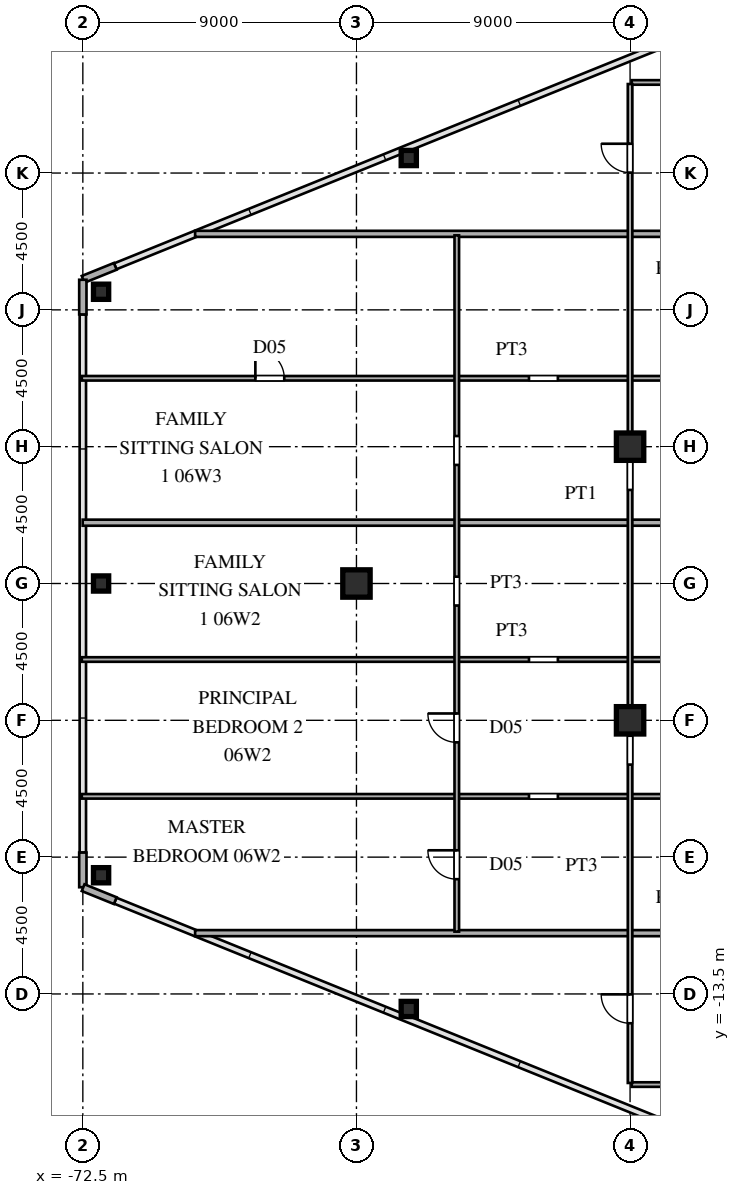
"""IFC4 building model, lengths in metres.
Left out: names, types, materials, properties, quantities, classifications, styles, units other than length and angle.
Written with IfcOpenShell. Run it as: python <this file> out.ifc"""

import sys

from ifc_helpers import new_model, si_unit, direction, frame, frame_2d, origin, origin_2d, place, context, subcontext, project, spatial, rectangle, hollow_rectangle, i_section, extrude, source, transform, mapped, element, fill, save


model = new_model("IFC4")
c1 = context("Model", 3, precision=1e-05, world=origin(), true_north=direction((0.0, 1.0)))
c2 = subcontext(c1, "Body", "Model", "MODEL_VIEW")
j1 = project(units=[si_unit("LENGTHUNIT", "METRE"), si_unit("PLANEANGLEUNIT", "RADIAN")], contexts=[c1])
p1 = place(None, origin())
s1 = spatial("IfcSite", under=j1, at=p1, CompositionType="ELEMENT")
p2 = place(p1, origin())
s2 = spatial("IfcBuilding", under=s1, at=p2, CompositionType="ELEMENT")
p3 = place(p2, frame((0.0, 0.0, 26.1)))
s3 = spatial("IfcBuildingStorey", under=s2, at=p3, CompositionType="ELEMENT", Elevation=26.1)
m1 = source(origin(), c2, "Body", "SweptSolid", [
    extrude(i_section(OverallWidth=0.9, OverallDepth=0.9, WebThickness=0.036, FlangeThickness=0.055, at=origin_2d()), origin(), (0.0, 0.0, 1.0), 3.6),
])
for number, where, z_axis, x_axis in (
    (1, (-54.5, -4.5, 0.0), (0.0, 0.0, 1.0), (1.0, 0.0, 0.0)),
    (2, (-54.5, 4.5, 0.0), (0.0, 0.0, 1.0), (1.0, 0.0, 0.0)),
    (3, (-63.5, 0.0, 0.0), (0.0, 0.0, 1.0), (1.0, 0.0, 0.0)),
):
    element("IfcColumn", number, at=place(p3, frame(where, z_axis=z_axis, x_axis=x_axis)), inside=s3, PredefinedType="COLUMN", context=c2, shape_type="MappedRepresentation", body=[
        mapped(m1, transform((0.0, 0.0, 0.0), scale=1.0)),
    ])
m2 = source(origin(), c2, "Body", "SweptSolid", [
    extrude(hollow_rectangle(XDim=0.5, YDim=0.5, WallThickness=0.02, at=origin_2d()), origin(), (0.0, 0.0, 1.0), 3.6),
])
for number, where, z_axis, x_axis in (
    (4, (-71.9, 9.596, 0.0), (0.0, 0.0, 1.0), (1.0, 0.0, 0.0)),
    (5, (-71.9, -9.596, 0.0), (0.0, 0.0, 1.0), (1.0, 0.0, 0.0)),
    (6, (-61.779, -13.994, 0.0), (0.0, 0.0, 1.0), (1.0, 0.0, 0.0)),
    (7, (-61.779, 13.994, 0.0), (0.0, 0.0, 1.0), (1.0, 0.0, 0.0)),
    (8, (-71.9, 0.0, 0.0), (0.0, 0.0, 1.0), (1.0, 0.0, 0.0)),
):
    element("IfcColumn", number, at=place(p3, frame(where, z_axis=z_axis, x_axis=x_axis)), inside=s3, PredefinedType="COLUMN", context=c2, shape_type="MappedRepresentation", body=[
        mapped(m2, transform((0.0, 0.0, 0.0), scale=1.0)),
    ])
for number, where, z_axis, x_axis in (
    (9, (-71.434, 10.431, 0.0), (0.0, 0.0, 1.0), (-0.927, -0.375, 0.0)),
    (10, (-72.5, 9.99, 0.0), (0.0, 0.0, 1.0), (0.0, -1.0, 0.0)),
    (11, (-72.5, -8.85, 0.0), (0.0, 0.0, 1.0), (0.0, -1.0, 0.0)),
    (12, (-72.491, -10.004, 0.0), (0.0, 0.0, 1.0), (0.927, -0.375, 0.0)),
):
    element("IfcWall", number, at=place(p3, frame(where, z_axis=z_axis, x_axis=x_axis)), inside=s3, PredefinedType="SOLIDWALL", context=c2, shape_type="SweptSolid", body=[
        extrude(rectangle(XDim=1.14, YDim=0.24, at=frame_2d((0.57, 0.0))), origin(), (0.0, 0.0, 1.0), 3.38),
    ])
p4 = place(p3, frame((-54.45, -16.48, 0.0), z_axis=(0.0, 0.0, 1.0), x_axis=(1.0, 0.0, 0.0)))
e13 = element("IfcWall", 13, at=p4, inside=s3, PredefinedType="PARTITIONING", context=c2, shape_type="SweptSolid", body=[
    extrude(rectangle(XDim=10.2, YDim=0.15, at=frame_2d((5.1, 0.0))), origin(), (0.0, 0.0, 1.0), 3.38),
])
p5 = place(p4, frame((4.625, 0.0, 0.0)))
e14 = element("IfcOpeningElement", 14, at=p5, cuts=e13, PredefinedType="OPENING", context=c2, shape_type="SweptSolid", body=[
    extrude(rectangle(XDim=0.95, YDim=2.15, at=frame_2d((0.475, 1.075))), frame((0.0, 0.085, 0.0), z_axis=(0.0, -1.0, 0.0), x_axis=(1.0, 0.0, 0.0)), (0.0, 0.0, 1.0), 0.17),
])
p6 = place(p3, frame((-68.807, -11.5, 0.0), z_axis=(0.0, 0.0, 1.0), x_axis=(1.0, 0.0, 0.0)))
e15 = element("IfcWall", 15, at=p6, inside=s3, PredefinedType="PARTITIONING", context=c2, shape_type="SweptSolid", body=[
    extrude(rectangle(XDim=29.077, YDim=0.2, at=frame_2d((14.539, 0.0))), origin(), (0.0, 0.0, 1.0), 3.38),
])
p7 = place(p3, frame((-72.535, -7.0, 0.0), z_axis=(0.0, 0.0, 1.0), x_axis=(1.0, 0.0, 0.0)))
e16 = element("IfcWall", 16, at=p7, inside=s3, PredefinedType="PARTITIONING", context=c2, shape_type="SweptSolid", body=[
    extrude(rectangle(XDim=28.285, YDim=0.15, at=frame_2d((14.143, 0.0))), origin(), (0.0, 0.0, 1.0), 3.38),
])
p8 = place(p7, frame((22.71, 0.0, 0.0)))
e17 = element("IfcOpeningElement", 17, at=p8, cuts=e16, PredefinedType="OPENING", context=c2, shape_type="SweptSolid", body=[
    extrude(rectangle(XDim=0.95, YDim=2.15, at=frame_2d((0.475, 1.075))), frame((0.0, 0.085, 0.0), z_axis=(0.0, -1.0, 0.0), x_axis=(1.0, 0.0, 0.0)), (0.0, 0.0, 1.0), 0.17),
])
p9 = place(p7, frame((14.71, 0.0, 0.0)))
e18 = element("IfcOpeningElement", 18, at=p9, cuts=e16, PredefinedType="OPENING", context=c2, shape_type="SweptSolid", body=[
    extrude(rectangle(XDim=0.95, YDim=2.15, at=frame_2d((0.475, 1.075))), frame((0.0, 0.085, 0.0), z_axis=(0.0, -1.0, 0.0), x_axis=(1.0, 0.0, 0.0)), (0.0, 0.0, 1.0), 0.17),
])
p10 = place(p3, frame((-72.535, -2.5, 0.0), z_axis=(0.0, 0.0, 1.0), x_axis=(1.0, 0.0, 0.0)))
e19 = element("IfcWall", 19, at=p10, inside=s3, PredefinedType="PARTITIONING", context=c2, shape_type="SweptSolid", body=[
    extrude(rectangle(XDim=28.285, YDim=0.15, at=frame_2d((14.143, 0.0))), origin(), (0.0, 0.0, 1.0), 3.38),
])
p11 = place(p10, frame((22.71, 0.0, 0.0)))
e20 = element("IfcOpeningElement", 20, at=p11, cuts=e19, PredefinedType="OPENING", context=c2, shape_type="SweptSolid", body=[
    extrude(rectangle(XDim=0.95, YDim=2.15, at=frame_2d((0.475, 1.075))), frame((0.0, 0.085, 0.0), z_axis=(0.0, -1.0, 0.0), x_axis=(1.0, 0.0, 0.0)), (0.0, 0.0, 1.0), 0.17),
])
p12 = place(p10, frame((14.71, 0.0, 0.0)))
e21 = element("IfcOpeningElement", 21, at=p12, cuts=e19, PredefinedType="OPENING", context=c2, shape_type="SweptSolid", body=[
    extrude(rectangle(XDim=0.95, YDim=2.15, at=frame_2d((0.475, 1.075))), frame((0.0, 0.085, 0.0), z_axis=(0.0, -1.0, 0.0), x_axis=(1.0, 0.0, 0.0)), (0.0, 0.0, 1.0), 0.17),
])
p13 = place(p3, frame((-72.505, 2.0, 0.0), z_axis=(0.0, 0.0, 1.0), x_axis=(1.0, 0.0, 0.0)))
e22 = element("IfcWall", 22, at=p13, inside=s3, PredefinedType="PARTITIONING", context=c2, shape_type="SweptSolid", body=[
    extrude(rectangle(XDim=32.775, YDim=0.2, at=frame_2d((16.387, 0.0))), origin(), (0.0, 0.0, 1.0), 3.38),
])
p14 = place(p3, frame((-72.535, 6.75, 0.0), z_axis=(0.0, 0.0, 1.0), x_axis=(1.0, 0.0, 0.0)))
e23 = element("IfcWall", 23, at=p14, inside=s3, PredefinedType="PARTITIONING", context=c2, shape_type="SweptSolid", body=[
    extrude(rectangle(XDim=28.285, YDim=0.15, at=frame_2d((14.143, 0.0))), origin(), (0.0, 0.0, 1.0), 3.38),
])
p15 = place(p14, frame((5.71, 0.0, 0.0)))
e24 = element("IfcOpeningElement", 24, at=p15, cuts=e23, PredefinedType="OPENING", context=c2, shape_type="SweptSolid", body=[
    extrude(rectangle(XDim=0.95, YDim=2.15, at=frame_2d((0.475, 1.075))), frame((0.0, 0.085, 0.0), z_axis=(0.0, -1.0, 0.0), x_axis=(1.0, 0.0, 0.0)), (0.0, 0.0, 1.0), 0.17),
])
p16 = place(p14, frame((14.71, 0.0, 0.0)))
e25 = element("IfcOpeningElement", 25, at=p16, cuts=e23, PredefinedType="OPENING", context=c2, shape_type="SweptSolid", body=[
    extrude(rectangle(XDim=0.95, YDim=2.15, at=frame_2d((0.475, 1.075))), frame((0.0, 0.085, 0.0), z_axis=(0.0, -1.0, 0.0), x_axis=(1.0, 0.0, 0.0)), (0.0, 0.0, 1.0), 0.17),
])
p17 = place(p3, frame((-68.807, 11.5, 0.0), z_axis=(0.0, 0.0, 1.0), x_axis=(1.0, 0.0, 0.0)))
e26 = element("IfcWall", 26, at=p17, inside=s3, PredefinedType="PARTITIONING", context=c2, shape_type="SweptSolid", body=[
    extrude(rectangle(XDim=29.077, YDim=0.2, at=frame_2d((14.539, 0.0))), origin(), (0.0, 0.0, 1.0), 3.38),
])
p18 = place(p3, frame((-54.45, 16.48, 0.0), z_axis=(0.0, 0.0, 1.0), x_axis=(1.0, 0.0, 0.0)))
e27 = element("IfcWall", 27, at=p18, inside=s3, PredefinedType="PARTITIONING", context=c2, shape_type="SweptSolid", body=[
    extrude(rectangle(XDim=10.2, YDim=0.15, at=frame_2d((5.1, 0.0))), origin(), (0.0, 0.0, 1.0), 3.38),
])
p19 = place(p18, frame((4.625, 0.0, 0.0)))
e28 = element("IfcOpeningElement", 28, at=p19, cuts=e27, PredefinedType="OPENING", context=c2, shape_type="SweptSolid", body=[
    extrude(rectangle(XDim=0.95, YDim=2.15, at=frame_2d((0.475, 1.075))), frame((0.0, 0.085, 0.0), z_axis=(0.0, -1.0, 0.0), x_axis=(1.0, 0.0, 0.0)), (0.0, 0.0, 1.0), 0.17),
])
p20 = place(p3, frame((-60.2, -11.45, 0.0), z_axis=(0.0, 0.0, 1.0), x_axis=(0.0, 1.0, 0.0)))
e29 = element("IfcWall", 29, at=p20, inside=s3, PredefinedType="PARTITIONING", context=c2, shape_type="SweptSolid", body=[
    extrude(rectangle(XDim=22.9, YDim=0.15, at=frame_2d((11.45, 0.0))), origin(), (0.0, 0.0, 1.0), 3.38),
])
p21 = place(p20, frame((1.725, 0.0, 0.0)))
e30 = element("IfcOpeningElement", 30, at=p21, cuts=e29, PredefinedType="OPENING", context=c2, shape_type="SweptSolid", body=[
    extrude(rectangle(XDim=0.95, YDim=2.15, at=frame_2d((0.475, 1.075))), frame((0.0, 0.085, 0.0), z_axis=(0.0, -1.0, 0.0), x_axis=(1.0, 0.0, 0.0)), (0.0, 0.0, 1.0), 0.17),
])
p22 = place(p20, frame((6.225, 0.0, 0.0)))
e31 = element("IfcOpeningElement", 31, at=p22, cuts=e29, PredefinedType="OPENING", context=c2, shape_type="SweptSolid", body=[
    extrude(rectangle(XDim=0.95, YDim=2.15, at=frame_2d((0.475, 1.075))), frame((0.0, 0.085, 0.0), z_axis=(0.0, -1.0, 0.0), x_axis=(1.0, 0.0, 0.0)), (0.0, 0.0, 1.0), 0.17),
])
p23 = place(p20, frame((10.725, 0.0, 0.0)))
e32 = element("IfcOpeningElement", 32, at=p23, cuts=e29, PredefinedType="OPENING", context=c2, shape_type="SweptSolid", body=[
    extrude(rectangle(XDim=0.95, YDim=2.15, at=frame_2d((0.475, 1.075))), frame((0.0, 0.085, 0.0), z_axis=(0.0, -1.0, 0.0), x_axis=(1.0, 0.0, 0.0)), (0.0, 0.0, 1.0), 0.17),
])
p24 = place(p20, frame((15.35, 0.0, 0.0)))
e33 = element("IfcOpeningElement", 33, at=p24, cuts=e29, PredefinedType="OPENING", context=c2, shape_type="SweptSolid", body=[
    extrude(rectangle(XDim=0.95, YDim=2.15, at=frame_2d((0.475, 1.075))), frame((0.0, 0.085, 0.0), z_axis=(0.0, -1.0, 0.0), x_axis=(1.0, 0.0, 0.0)), (0.0, 0.0, 1.0), 0.17),
])
p25 = place(p3, frame((-54.5, -16.427, 0.0), z_axis=(0.0, 0.0, 1.0), x_axis=(0.0, 1.0, 0.0)))
e34 = element("IfcWall", 34, at=p25, inside=s3, PredefinedType="PARTITIONING", context=c2, shape_type="SweptSolid", body=[
    extrude(rectangle(XDim=32.854, YDim=0.15, at=frame_2d((16.427, 0.0))), origin(), (0.0, 0.0, 1.0), 2.68),
])
p26 = place(p25, frame((1.963, 0.0, 0.0)))
e35 = element("IfcOpeningElement", 35, at=p26, cuts=e34, PredefinedType="OPENING", context=c2, shape_type="SweptSolid", body=[
    extrude(rectangle(XDim=0.95, YDim=2.15, at=frame_2d((0.475, 1.075))), frame((0.0, 0.085, 0.0), z_axis=(0.0, -1.0, 0.0), x_axis=(1.0, 0.0, 0.0)), (0.0, 0.0, 1.0), 0.17),
])
p27 = place(p25, frame((10.47, 0.0, 0.0)))
e36 = element("IfcOpeningElement", 36, at=p27, cuts=e34, PredefinedType="OPENING", context=c2, shape_type="SweptSolid", body=[
    extrude(rectangle(XDim=0.95, YDim=2.15, at=frame_2d((0.475, 1.075))), frame((0.0, 0.085, 0.0), z_axis=(0.0, -1.0, 0.0), x_axis=(1.0, 0.0, 0.0)), (0.0, 0.0, 1.0), 0.17),
])
p28 = place(p25, frame((19.504, 0.0, 0.0)))
e37 = element("IfcOpeningElement", 37, at=p28, cuts=e34, PredefinedType="OPENING", context=c2, shape_type="SweptSolid", body=[
    extrude(rectangle(XDim=0.95, YDim=2.15, at=frame_2d((0.475, 1.075))), frame((0.0, 0.085, 0.0), z_axis=(0.0, -1.0, 0.0), x_axis=(1.0, 0.0, 0.0)), (0.0, 0.0, 1.0), 0.17),
])
p29 = place(p25, frame((29.941, 0.0, 0.0)))
e38 = element("IfcOpeningElement", 38, at=p29, cuts=e34, PredefinedType="OPENING", context=c2, shape_type="SweptSolid", body=[
    extrude(rectangle(XDim=0.95, YDim=2.15, at=frame_2d((0.475, 1.075))), frame((0.0, 0.085, 0.0), z_axis=(0.0, -1.0, 0.0), x_axis=(1.0, 0.0, 0.0)), (0.0, 0.0, 1.0), 0.17),
])
m3 = source(origin(), c2, "Body", "SweptSolid", [
    extrude(rectangle(XDim=0.95, YDim=2.15, at=frame_2d((0.475, 1.075))), frame((0.0, 0.025, 0.0), z_axis=(0.0, -1.0, 0.0), x_axis=(1.0, 0.0, 0.0)), (0.0, 0.0, 1.0), 0.05),
])
p30 = place(p15, origin())
e39 = element("IfcDoor", 39, at=p30, inside=s3, OperationType="SINGLE_SWING_LEFT", PredefinedType="DOOR", context=c2, shape_type="MappedRepresentation", body=[
    mapped(m3, transform((0.0, 0.0, 0.0), scale=1.0)),
])
fill(e24, e39)
p31 = place(p21, origin())
e40 = element("IfcDoor", 40, at=p31, inside=s3, OperationType="SINGLE_SWING_RIGHT", PredefinedType="DOOR", context=c2, shape_type="MappedRepresentation", body=[
    mapped(m3, transform((0.0, 0.0, 0.0), scale=1.0)),
])
fill(e30, e40)
p32 = place(p22, origin())
e41 = element("IfcDoor", 41, at=p32, inside=s3, OperationType="SINGLE_SWING_RIGHT", PredefinedType="DOOR", context=c2, shape_type="MappedRepresentation", body=[
    mapped(m3, transform((0.0, 0.0, 0.0), scale=1.0)),
])
fill(e31, e41)
p33 = place(p26, origin())
e42 = element("IfcDoor", 42, at=p33, inside=s3, OperationType="SINGLE_SWING_RIGHT", PredefinedType="DOOR", context=c2, shape_type="MappedRepresentation", body=[
    mapped(m3, transform((0.0, 0.0, 0.0), scale=1.0)),
])
fill(e35, e42)
p34 = place(p29, origin())
e43 = element("IfcDoor", 43, at=p34, inside=s3, OperationType="SINGLE_SWING_RIGHT", PredefinedType="DOOR", context=c2, shape_type="MappedRepresentation", body=[
    mapped(m3, transform((0.0, 0.0, 0.0), scale=1.0)),
])
fill(e38, e43)
save(model, sys.argv[1])
